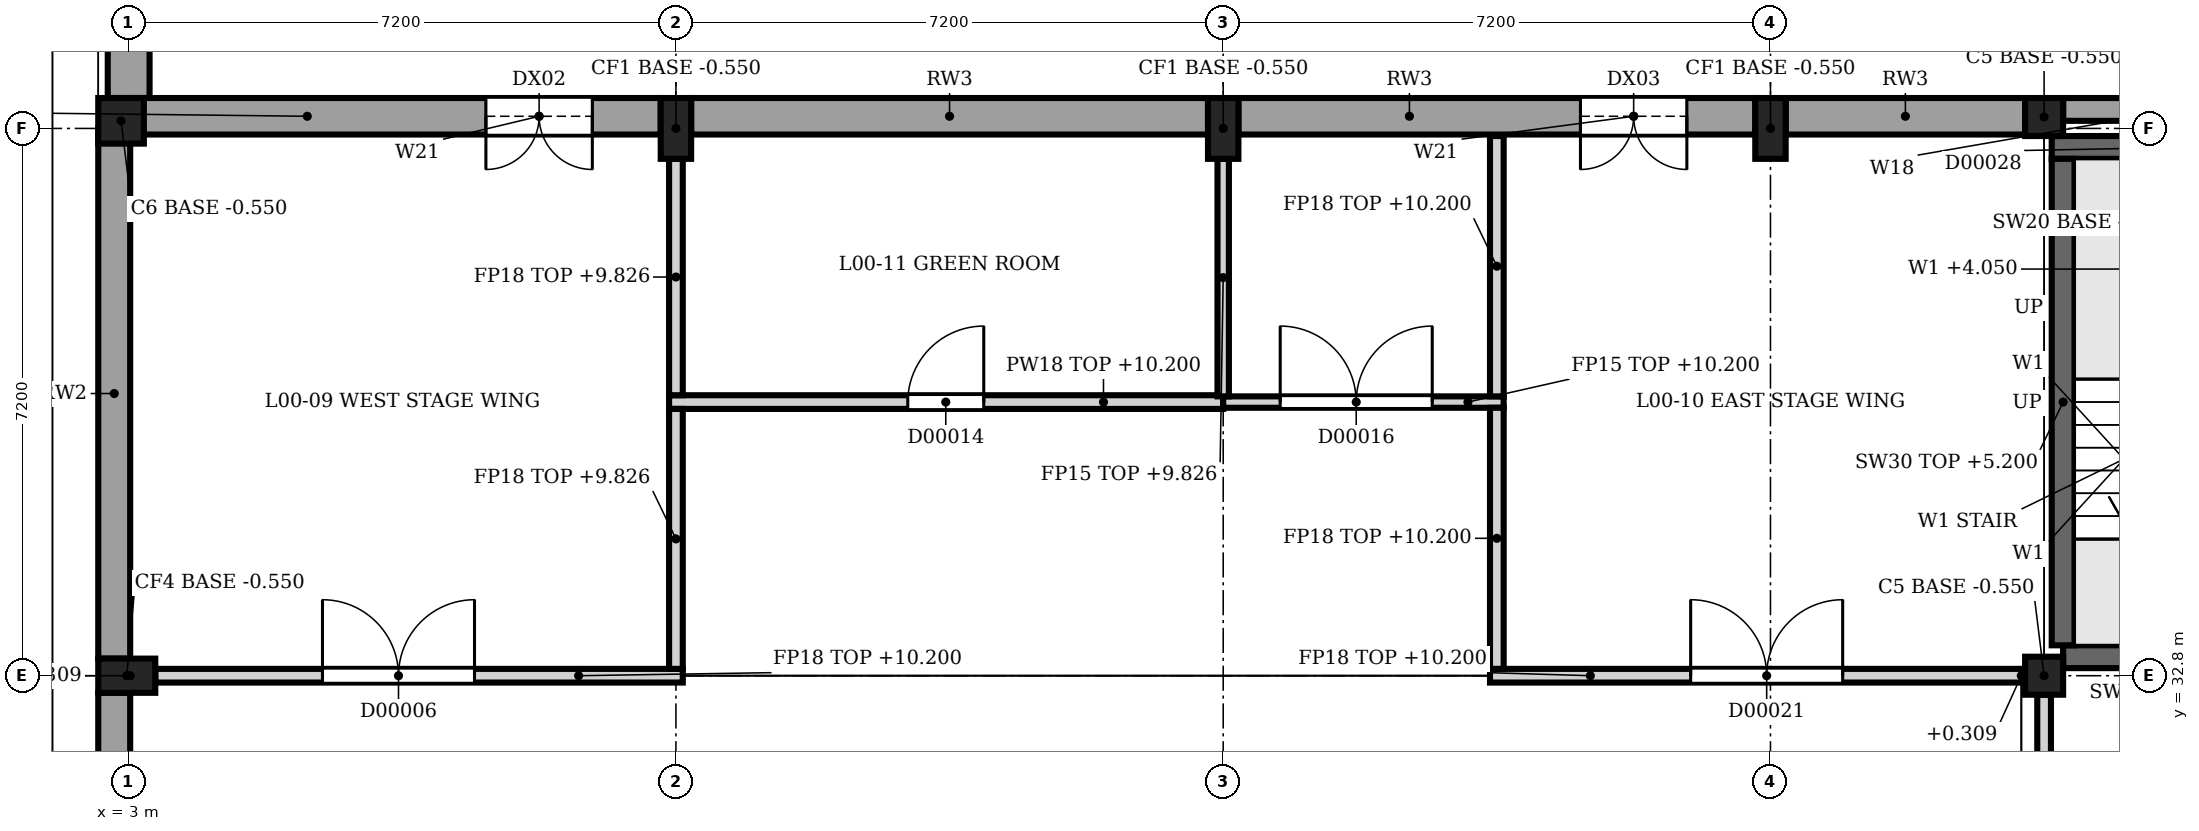
"""IFC4 building model, lengths in metres.
Left out: names, types, materials, properties, quantities, classifications, styles, units other than length and angle.
Written with IfcOpenShell. Run it as: python <this file> out.ifc"""

import sys

from ifc_helpers import new_model, si_unit, direction, frame, frame_2d, origin, origin_2d, place, context, subcontext, project, spatial, rectangle, extrude, element, fill, save


model = new_model("IFC4")
c1 = context("Model", 3, precision=1e-05, world=origin(), true_north=direction((0.0, 1.0)))
c2 = subcontext(c1, "Body", "Model", "MODEL_VIEW")
j1 = project(units=[si_unit("LENGTHUNIT", "METRE"), si_unit("PLANEANGLEUNIT", "RADIAN")], contexts=[c1])
p1 = place(None, origin())
s1 = spatial("IfcSite", under=j1, at=p1, CompositionType="ELEMENT")
p2 = place(p1, origin())
s2 = spatial("IfcBuilding", under=s1, at=p2, CompositionType="ELEMENT")
p3 = place(p2, origin())
s3 = spatial("IfcBuildingStorey", under=s2, at=p3, CompositionType="ELEMENT", Elevation=0.0)
for number, where, z_axis, x_axis in (
    (1, (28.2, 32.8, -0.55), (0.0, 0.0, 1.0), (1.0, 0.0, 0.0)),
    (2, (28.2, 40.15, -0.55), (0.0, 0.0, 1.0), (1.0, 0.0, 0.0)),
):
    element("IfcColumn", number, at=place(p3, frame(where, z_axis=z_axis, x_axis=x_axis)), inside=s3, PredefinedType="COLUMN", context=c2, shape_type="SweptSolid", body=[
        extrude(rectangle(XDim=0.5, YDim=0.5, at=origin_2d()), origin(), (0.0, 0.0, 1.0), 5.95),
    ])
p4 = place(p3, frame((2.975, 32.8, -0.55), z_axis=(0.0, 0.0, 1.0), x_axis=(1.0, 0.0, 0.0)))
e3 = element("IfcColumn", 3, at=p4, inside=s3, PredefinedType="COLUMN", context=c2, shape_type="SweptSolid", body=[
    extrude(rectangle(XDim=0.75, YDim=0.45, at=origin_2d()), origin(), (0.0, 0.0, 1.0), 5.95),
])
p5 = place(p3, frame((2.9, 40.1, -0.55), z_axis=(0.0, 0.0, 1.0), x_axis=(1.0, 0.0, 0.0)))
e4 = element("IfcColumn", 4, at=p5, inside=s3, PredefinedType="COLUMN", context=c2, shape_type="SweptSolid", body=[
    extrude(rectangle(XDim=0.6, YDim=0.6, at=origin_2d()), origin(), (0.0, 0.0, 1.0), 5.95),
])
for number, where, z_axis, x_axis in (
    (5, (10.2, 40.0, -0.55), (0.0, 0.0, 1.0), (1.0, 0.0, 0.0)),
    (6, (17.4, 40.0, -0.55), (0.0, 0.0, 1.0), (1.0, 0.0, 0.0)),
    (7, (24.6, 40.0, -0.55), (0.0, 0.0, 1.0), (1.0, 0.0, 0.0)),
):
    element("IfcColumn", number, at=place(p3, frame(where, z_axis=z_axis, x_axis=x_axis)), inside=s3, PredefinedType="COLUMN", context=c2, shape_type="SweptSolid", body=[
        extrude(rectangle(XDim=0.4, YDim=0.8, at=origin_2d()), origin(), (0.0, 0.0, 1.0), 5.95),
    ])
p6 = place(p3, frame((3.0, 40.16, 0.0), z_axis=(0.0, 0.0, 1.0), x_axis=(1.0, 0.0, 0.0)))
e8 = element("IfcWall", 8, at=p6, inside=s3, PredefinedType="SOLIDWALL", context=c2, shape_type="SweptSolid", body=[
    extrude(rectangle(XDim=7.0, YDim=0.48, at=frame_2d((3.5, 0.0))), origin(), (0.0, 0.0, 1.0), 5.4),
])
p7 = place(p6, frame((4.7, 0.0, 0.0)))
e9 = element("IfcOpeningElement", 9, at=p7, cuts=e8, PredefinedType="OPENING", context=c2, shape_type="SweptSolid", body=[
    extrude(rectangle(XDim=1.4, YDim=2.4, at=frame_2d((0.7, 1.2))), frame((0.0, 0.25, 0.0), z_axis=(0.0, -1.0, 0.0), x_axis=(1.0, 0.0, 0.0)), (0.0, 0.0, 1.0), 0.5),
])
p8 = place(p6, frame((4.7, 0.0, 2.5)))
e10 = element("IfcOpeningElement", 10, at=p8, cuts=e8, PredefinedType="OPENING", context=c2, shape_type="SweptSolid", body=[
    extrude(rectangle(XDim=1.4, YDim=0.45, at=frame_2d((0.7, 0.225))), frame((0.0, 0.25, 0.0), z_axis=(0.0, -1.0, 0.0), x_axis=(1.0, 0.0, 0.0)), (0.0, 0.0, 1.0), 0.5),
])
p9 = place(p3, frame((10.4, 40.16, 0.0), z_axis=(0.0, 0.0, 1.0), x_axis=(1.0, 0.0, 0.0)))
e11 = element("IfcWall", 11, at=p9, inside=s3, PredefinedType="SOLIDWALL", context=c2, shape_type="SweptSolid", body=[
    extrude(rectangle(XDim=6.8, YDim=0.48, at=frame_2d((3.4, 0.0))), origin(), (0.0, 0.0, 1.0), 5.4),
])
p10 = place(p3, frame((17.6, 40.16, 0.0), z_axis=(0.0, 0.0, 1.0), x_axis=(1.0, 0.0, 0.0)))
e12 = element("IfcWall", 12, at=p10, inside=s3, PredefinedType="SOLIDWALL", context=c2, shape_type="SweptSolid", body=[
    extrude(rectangle(XDim=6.8, YDim=0.48, at=frame_2d((3.4, 0.0))), origin(), (0.0, 0.0, 1.0), 5.4),
])
p11 = place(p10, frame((4.5, 0.0, 0.0)))
e13 = element("IfcOpeningElement", 13, at=p11, cuts=e12, PredefinedType="OPENING", context=c2, shape_type="SweptSolid", body=[
    extrude(rectangle(XDim=1.4, YDim=2.4, at=frame_2d((0.7, 1.2))), frame((0.0, 0.25, 0.0), z_axis=(0.0, -1.0, 0.0), x_axis=(1.0, 0.0, 0.0)), (0.0, 0.0, 1.0), 0.5),
])
p12 = place(p10, frame((4.5, 0.0, 2.5)))
e14 = element("IfcOpeningElement", 14, at=p12, cuts=e12, PredefinedType="OPENING", context=c2, shape_type="SweptSolid", body=[
    extrude(rectangle(XDim=1.4, YDim=0.45, at=frame_2d((0.7, 0.225))), frame((0.0, 0.25, 0.0), z_axis=(0.0, -1.0, 0.0), x_axis=(1.0, 0.0, 0.0)), (0.0, 0.0, 1.0), 0.5),
])
p13 = place(p3, frame((24.8, 40.16, 0.0), z_axis=(0.0, 0.0, 1.0), x_axis=(1.0, 0.0, 0.0)))
e15 = element("IfcWall", 15, at=p13, inside=s3, PredefinedType="SOLIDWALL", context=c2, shape_type="SweptSolid", body=[
    extrude(rectangle(XDim=3.15, YDim=0.48, at=frame_2d((1.575, 0.0))), origin(), (0.0, 0.0, 1.0), 5.4),
])
p14 = place(p3, frame((28.45, 40.25, 0.0), z_axis=(0.0, 0.0, 1.0), x_axis=(1.0, 0.0, 0.0)))
e16 = element("IfcWall", 16, at=p14, inside=s3, PredefinedType="SOLIDWALL", context=c2, shape_type="SweptSolid", body=[
    extrude(rectangle(XDim=3.1, YDim=0.3, at=frame_2d((1.55, 0.0))), origin(), (0.0, 0.0, 1.0), 4.3),
])
p15 = place(p14, frame((1.0, 0.0, 0.0)))
e17 = element("IfcOpeningElement", 17, at=p15, cuts=e16, PredefinedType="OPENING", context=c2, shape_type="SweptSolid", body=[
    extrude(rectangle(XDim=1.1, YDim=2.2, at=frame_2d((0.55, 1.1))), frame((0.0, 0.16, 0.0), z_axis=(0.0, -1.0, 0.0), x_axis=(1.0, 0.0, 0.0)), (0.0, 0.0, 1.0), 0.32),
])
p16 = place(p14, frame((1.0, 0.0, 2.3)))
e18 = element("IfcOpeningElement", 18, at=p16, cuts=e16, PredefinedType="OPENING", context=c2, shape_type="SweptSolid", body=[
    extrude(rectangle(XDim=1.1, YDim=0.45, at=frame_2d((0.55, 0.225))), frame((0.0, 0.16, 0.0), z_axis=(0.0, -1.0, 0.0), x_axis=(1.0, 0.0, 0.0)), (0.0, 0.0, 1.0), 0.32),
])
p17 = place(p3, frame((2.81, 25.825, 0.0), z_axis=(0.0, 0.0, 1.0), x_axis=(0.0, 1.0, 0.0)))
e19 = element("IfcWall", 19, at=p17, inside=s3, PredefinedType="SOLIDWALL", context=c2, shape_type="SweptSolid", body=[
    extrude(rectangle(XDim=6.75, YDim=0.42, at=frame_2d((3.375, 0.0))), origin(), (0.0, 0.0, 1.0), 5.4),
])
p18 = place(p3, frame((2.81, 33.025, 0.0), z_axis=(0.0, 0.0, 1.0), x_axis=(0.0, 1.0, 0.0)))
e20 = element("IfcWall", 20, at=p18, inside=s3, PredefinedType="SOLIDWALL", context=c2, shape_type="SweptSolid", body=[
    extrude(rectangle(XDim=6.975, YDim=0.42, at=frame_2d((3.488, 0.0))), origin(), (0.0, 0.0, 1.0), 5.4),
])
p19 = place(p3, frame((3.0, 40.4, 0.0), z_axis=(0.0, 0.0, 1.0), x_axis=(0.0, 1.0, 0.0)))
e21 = element("IfcWall", 21, at=p19, inside=s3, PredefinedType="SOLIDWALL", context=c2, shape_type="SweptSolid", body=[
    extrude(rectangle(XDim=28.0, YDim=0.55, at=frame_2d((14.0, 0.0))), origin(), (0.0, 0.0, 1.0), 3.6),
])
p20 = place(p3, frame((28.45, 33.05, 0.0), z_axis=(0.0, 0.0, 1.0), x_axis=(1.0, 0.0, 0.0)))
e22 = element("IfcWall", 22, at=p20, inside=s3, PredefinedType="SHEAR", context=c2, shape_type="SweptSolid", body=[
    extrude(rectangle(XDim=3.1, YDim=0.3, at=frame_2d((1.55, 0.0))), origin(), (0.0, 0.0, 1.0), 5.2),
])
p21 = place(p3, frame((28.3, 39.75, 0.0), z_axis=(0.0, 0.0, 1.0), x_axis=(1.0, 0.0, 0.0)))
e23 = element("IfcWall", 23, at=p21, inside=s3, PredefinedType="SHEAR", context=c2, shape_type="SweptSolid", body=[
    extrude(rectangle(XDim=7.0, YDim=0.3, at=frame_2d((3.5, 0.0))), origin(), (0.0, 0.0, 1.0), 5.2),
])
p22 = place(p21, frame((1.15, 0.0, 0.0)))
e24 = element("IfcOpeningElement", 24, at=p22, cuts=e23, PredefinedType="OPENING", context=c2, shape_type="SweptSolid", body=[
    extrude(rectangle(XDim=1.1, YDim=2.1, at=frame_2d((0.55, 1.05))), frame((0.0, 0.16, 0.0), z_axis=(0.0, -1.0, 0.0), x_axis=(1.0, 0.0, 0.0)), (0.0, 0.0, 1.0), 0.32),
])
p23 = place(p3, frame((28.45, 33.2, 0.0), z_axis=(0.0, 0.0, 1.0), x_axis=(0.0, 1.0, 0.0)))
e25 = element("IfcWall", 25, at=p23, inside=s3, PredefinedType="SHEAR", context=c2, shape_type="SweptSolid", body=[
    extrude(rectangle(XDim=6.4, YDim=0.3, at=frame_2d((3.2, 0.0))), origin(), (0.0, 0.0, 1.0), 5.2),
])
p24 = place(p3, frame((3.35, 32.8, 0.0), z_axis=(0.0, 0.0, 1.0), x_axis=(1.0, 0.0, 0.0)))
e26 = element("IfcWall", 26, at=p24, inside=s3, PredefinedType="PARTITIONING", context=c2, shape_type="SweptSolid", body=[
    extrude(rectangle(XDim=6.94, YDim=0.18, at=frame_2d((3.47, 0.0))), origin(), (0.0, 0.0, 1.0), 10.2),
])
p25 = place(p24, frame((2.2, 0.0, 0.0)))
e27 = element("IfcOpeningElement", 27, at=p25, cuts=e26, PredefinedType="OPENING", context=c2, shape_type="SweptSolid", body=[
    extrude(rectangle(XDim=2.0, YDim=2.2, at=frame_2d((1.0, 1.1))), frame((0.0, 0.1, 0.0), z_axis=(0.0, -1.0, 0.0), x_axis=(1.0, 0.0, 0.0)), (0.0, 0.0, 1.0), 0.2),
])
p26 = place(p3, frame((20.91, 32.8, 0.0), z_axis=(0.0, 0.0, 1.0), x_axis=(1.0, 0.0, 0.0)))
e28 = element("IfcWall", 28, at=p26, inside=s3, PredefinedType="PARTITIONING", context=c2, shape_type="SweptSolid", body=[
    extrude(rectangle(XDim=7.04, YDim=0.18, at=frame_2d((3.52, 0.0))), origin(), (0.0, 0.0, 1.0), 10.2),
])
p27 = place(p26, frame((2.64, 0.0, 0.0)))
e29 = element("IfcOpeningElement", 29, at=p27, cuts=e28, PredefinedType="OPENING", context=c2, shape_type="SweptSolid", body=[
    extrude(rectangle(XDim=2.0, YDim=2.2, at=frame_2d((1.0, 1.1))), frame((0.0, 0.1, 0.0), z_axis=(0.0, -1.0, 0.0), x_axis=(1.0, 0.0, 0.0)), (0.0, 0.0, 1.0), 0.2),
])
p28 = place(p3, frame((10.11, 36.4, 0.0), z_axis=(0.0, 0.0, 1.0), x_axis=(1.0, 0.0, 0.0)))
e30 = element("IfcWall", 30, at=p28, inside=s3, PredefinedType="PARTITIONING", context=c2, shape_type="SweptSolid", body=[
    extrude(rectangle(XDim=7.29, YDim=0.18, at=frame_2d((3.645, 0.0))), origin(), (0.0, 0.0, 1.0), 10.2),
])
p29 = place(p28, frame((3.14, 0.0, 0.0)))
e31 = element("IfcOpeningElement", 31, at=p29, cuts=e30, PredefinedType="OPENING", context=c2, shape_type="SweptSolid", body=[
    extrude(rectangle(XDim=1.0, YDim=2.1, at=frame_2d((0.5, 1.05))), frame((0.0, 0.1, 0.0), z_axis=(0.0, -1.0, 0.0), x_axis=(1.0, 0.0, 0.0)), (0.0, 0.0, 1.0), 0.2),
])
p30 = place(p3, frame((17.4, 36.4, 0.0), z_axis=(0.0, 0.0, 1.0), x_axis=(1.0, 0.0, 0.0)))
e32 = element("IfcWall", 32, at=p30, inside=s3, PredefinedType="PARTITIONING", context=c2, shape_type="SweptSolid", body=[
    extrude(rectangle(XDim=3.69, YDim=0.15, at=frame_2d((1.845, 0.0))), origin(), (0.0, 0.0, 1.0), 10.2),
])
p31 = place(p30, frame((0.75, 0.0, 0.0)))
e33 = element("IfcOpeningElement", 33, at=p31, cuts=e32, PredefinedType="OPENING", context=c2, shape_type="SweptSolid", body=[
    extrude(rectangle(XDim=2.0, YDim=2.2, at=frame_2d((1.0, 1.1))), frame((0.0, 0.085, 0.0), z_axis=(0.0, -1.0, 0.0), x_axis=(1.0, 0.0, 0.0)), (0.0, 0.0, 1.0), 0.17),
])
p32 = place(p3, frame((10.2, 32.89, 0.0), z_axis=(0.0, 0.0, 1.0), x_axis=(0.0, 1.0, 0.0)))
e34 = element("IfcWall", 34, at=p32, inside=s3, PredefinedType="PARTITIONING", context=c2, shape_type="SweptSolid", body=[
    extrude(rectangle(XDim=3.42, YDim=0.18, at=frame_2d((1.71, 0.0))), origin(), (0.0, 0.0, 1.0), 9.826),
])
p33 = place(p3, frame((10.2, 36.49, 0.0), z_axis=(0.0, 0.0, 1.0), x_axis=(0.0, 1.0, 0.0)))
e35 = element("IfcWall", 35, at=p33, inside=s3, PredefinedType="PARTITIONING", context=c2, shape_type="SweptSolid", body=[
    extrude(rectangle(XDim=3.11, YDim=0.18, at=frame_2d((1.555, 0.0))), origin(), (0.0, 0.0, 1.0), 9.826),
])
p34 = place(p3, frame((17.4, 36.475, 0.0), z_axis=(0.0, 0.0, 1.0), x_axis=(0.0, 1.0, 0.0)))
e36 = element("IfcWall", 36, at=p34, inside=s3, PredefinedType="PARTITIONING", context=c2, shape_type="SweptSolid", body=[
    extrude(rectangle(XDim=3.125, YDim=0.15, at=frame_2d((1.562, 0.0))), origin(), (0.0, 0.0, 1.0), 9.826),
])
p35 = place(p3, frame((21.0, 32.89, 0.0), z_axis=(0.0, 0.0, 1.0), x_axis=(0.0, 1.0, 0.0)))
e37 = element("IfcWall", 37, at=p35, inside=s3, PredefinedType="PARTITIONING", context=c2, shape_type="SweptSolid", body=[
    extrude(rectangle(XDim=3.435, YDim=0.18, at=frame_2d((1.718, 0.0))), origin(), (0.0, 0.0, 1.0), 10.2),
])
p36 = place(p3, frame((21.0, 36.475, 0.0), z_axis=(0.0, 0.0, 1.0), x_axis=(0.0, 1.0, 0.0)))
e38 = element("IfcWall", 38, at=p36, inside=s3, PredefinedType="PARTITIONING", context=c2, shape_type="SweptSolid", body=[
    extrude(rectangle(XDim=3.425, YDim=0.18, at=frame_2d((1.712, 0.0))), origin(), (0.0, 0.0, 1.0), 10.2),
])
p37 = place(p3, frame((28.2, 29.25, 0.0), z_axis=(0.0, 0.0, 1.0), x_axis=(0.0, 1.0, 0.0)))
e39 = element("IfcWall", 39, at=p37, inside=s3, PredefinedType="PARTITIONING", context=c2, shape_type="SweptSolid", body=[
    extrude(rectangle(XDim=3.3, YDim=0.18, at=frame_2d((1.65, 0.0))), origin(), (0.0, 0.0, 1.0), 5.2),
])
p38 = place(p7, origin())
e40 = element("IfcDoor", 40, at=p38, inside=s3, OperationType="SINGLE_SWING_LEFT", PredefinedType="DOOR", context=c2, shape_type="SweptSolid", body=[
    extrude(rectangle(XDim=1.4, YDim=2.4, at=frame_2d((0.7, 1.2))), frame((0.0, 0.025, 0.0), z_axis=(0.0, -1.0, 0.0), x_axis=(1.0, 0.0, 0.0)), (0.0, 0.0, 1.0), 0.05),
])
fill(e9, e40)
p39 = place(p8, origin())
e41 = element("IfcWindow", 41, at=p39, inside=s3, PartitioningType="SINGLE_PANEL", PredefinedType="WINDOW", context=c2, shape_type="SweptSolid", body=[
    extrude(rectangle(XDim=1.4, YDim=0.45, at=frame_2d((0.7, 0.225))), frame((0.0, 0.03, 0.0), z_axis=(0.0, -1.0, 0.0), x_axis=(1.0, 0.0, 0.0)), (0.0, 0.0, 1.0), 0.06),
])
fill(e10, e41)
p40 = place(p11, origin())
e42 = element("IfcDoor", 42, at=p40, inside=s3, OperationType="SINGLE_SWING_LEFT", PredefinedType="DOOR", context=c2, shape_type="SweptSolid", body=[
    extrude(rectangle(XDim=1.4, YDim=2.4, at=frame_2d((0.7, 1.2))), frame((0.0, 0.025, 0.0), z_axis=(0.0, -1.0, 0.0), x_axis=(1.0, 0.0, 0.0)), (0.0, 0.0, 1.0), 0.05),
])
fill(e13, e42)
p41 = place(p12, origin())
e43 = element("IfcWindow", 43, at=p41, inside=s3, PartitioningType="SINGLE_PANEL", PredefinedType="WINDOW", context=c2, shape_type="SweptSolid", body=[
    extrude(rectangle(XDim=1.4, YDim=0.45, at=frame_2d((0.7, 0.225))), frame((0.0, 0.03, 0.0), z_axis=(0.0, -1.0, 0.0), x_axis=(1.0, 0.0, 0.0)), (0.0, 0.0, 1.0), 0.06),
])
fill(e14, e43)
p42 = place(p25, origin())
e44 = element("IfcDoor", 44, at=p42, inside=s3, OperationType="SINGLE_SWING_LEFT", PredefinedType="DOOR", context=c2, shape_type="SweptSolid", body=[
    extrude(rectangle(XDim=2.0, YDim=2.2, at=frame_2d((1.0, 1.1))), frame((0.0, 0.025, 0.0), z_axis=(0.0, -1.0, 0.0), x_axis=(1.0, 0.0, 0.0)), (0.0, 0.0, 1.0), 0.05),
])
fill(e27, e44)
p43 = place(p27, origin())
e45 = element("IfcDoor", 45, at=p43, inside=s3, OperationType="SINGLE_SWING_LEFT", PredefinedType="DOOR", context=c2, shape_type="SweptSolid", body=[
    extrude(rectangle(XDim=2.0, YDim=2.2, at=frame_2d((1.0, 1.1))), frame((0.0, 0.025, 0.0), z_axis=(0.0, -1.0, 0.0), x_axis=(1.0, 0.0, 0.0)), (0.0, 0.0, 1.0), 0.05),
])
fill(e29, e45)
p44 = place(p29, origin())
e46 = element("IfcDoor", 46, at=p44, inside=s3, OperationType="SINGLE_SWING_LEFT", PredefinedType="DOOR", context=c2, shape_type="SweptSolid", body=[
    extrude(rectangle(XDim=1.0, YDim=2.1, at=frame_2d((0.5, 1.05))), frame((0.0, 0.025, 0.0), z_axis=(0.0, -1.0, 0.0), x_axis=(1.0, 0.0, 0.0)), (0.0, 0.0, 1.0), 0.05),
])
fill(e31, e46)
p45 = place(p31, origin())
e47 = element("IfcDoor", 47, at=p45, inside=s3, OperationType="SINGLE_SWING_LEFT", PredefinedType="DOOR", context=c2, shape_type="SweptSolid", body=[
    extrude(rectangle(XDim=2.0, YDim=2.2, at=frame_2d((1.0, 1.1))), frame((0.0, 0.025, 0.0), z_axis=(0.0, -1.0, 0.0), x_axis=(1.0, 0.0, 0.0)), (0.0, 0.0, 1.0), 0.05),
])
fill(e33, e47)
save(model, sys.argv[1])
